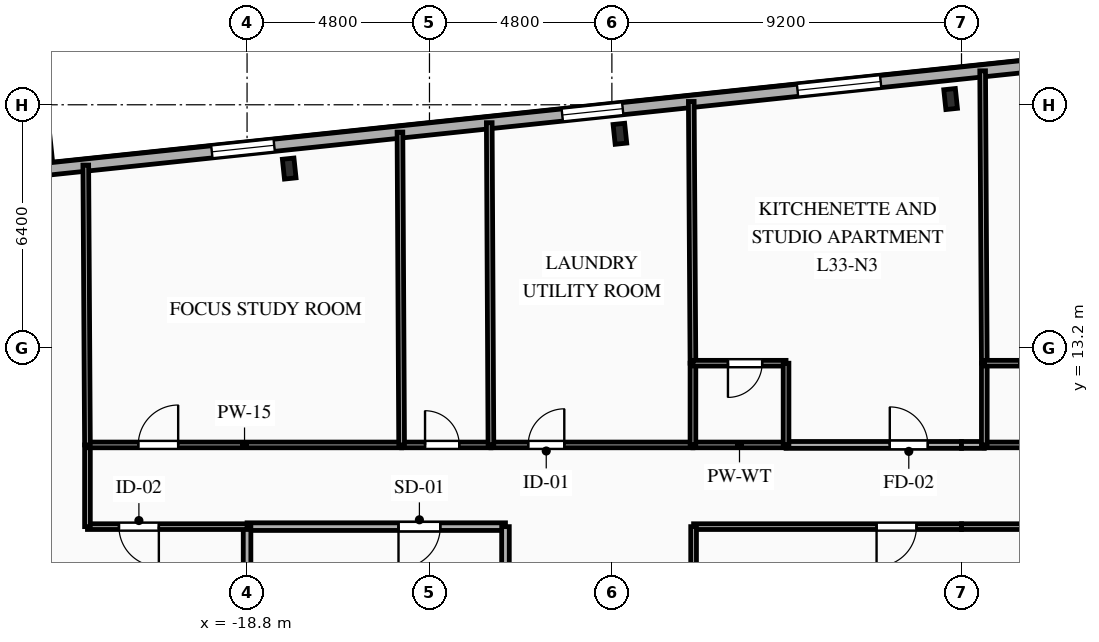
"""IFC4 building model, lengths in metres.
Left out: names, types, materials, properties, quantities, classifications, styles, units other than length and angle.
Written with IfcOpenShell. Run it as: python <this file> out.ifc"""

import sys

from ifc_helpers import new_model, si_unit, direction, frame, frame_2d, origin, origin_2d, place, context, subcontext, project, spatial, rectangle, i_section, extrude, element, fill, save


model = new_model("IFC4")
c1 = context("Model", 3, precision=1e-05, world=origin(), true_north=direction((0.0, 1.0)))
c2 = subcontext(c1, "Body", "Model", "MODEL_VIEW")
j1 = project(units=[si_unit("LENGTHUNIT", "METRE"), si_unit("PLANEANGLEUNIT", "RADIAN")], contexts=[c1])
p1 = place(None, origin())
s1 = spatial("IfcSite", under=j1, at=p1, CompositionType="ELEMENT")
p2 = place(p1, origin())
s2 = spatial("IfcBuilding", under=s1, at=p2, CompositionType="ELEMENT")
p3 = place(p2, frame((0.0, 0.0, 119.2)))
s3 = spatial("IfcBuildingStorey", under=s2, at=p3, CompositionType="ELEMENT", Elevation=119.2)
for number, where, z_axis, x_axis in (
    (1, (-0.287, 19.751, 0.0), (0.0, 0.0, 1.0), (0.995, 0.105, 0.0)),
    (2, (-8.989, 18.836, 0.0), (0.0, 0.0, 1.0), (0.995, 0.105, 0.0)),
    (3, (-17.691, 17.922, 0.0), (0.0, 0.0, 1.0), (0.995, 0.105, 0.0)),
):
    element("IfcColumn", number, at=place(p3, frame(where, z_axis=z_axis, x_axis=x_axis)), inside=s3, PredefinedType="COLUMN", context=c2, shape_type="SweptSolid", body=[
        extrude(i_section(OverallWidth=0.306, OverallDepth=0.524, WebThickness=0.021, FlangeThickness=0.04, FilletRadius=0.027, at=origin_2d()), origin(), (0.0, 0.0, 1.0), 3.35),
    ])
p4 = place(p3, frame((-27.107, 17.586, 0.0), z_axis=(0.0, 0.0, 1.0), x_axis=(0.994521628355, 0.104531003701, 0.0)))
e4 = element("IfcWall", 4, at=p4, inside=s3, PredefinedType="SOLIDWALL", context=c2, shape_type="SweptSolid", body=[
    extrude(rectangle(XDim=53.8, YDim=0.32, at=frame_2d((26.9, 0.0))), origin(), (0.0, 0.0, 1.0), 3.045),
])
p5 = place(p4, frame((1.457, 0.0, 0.85)))
e5 = element("IfcOpeningElement", 5, at=p5, cuts=e4, PredefinedType="OPENING", context=c2, shape_type="SweptSolid", body=[
    extrude(rectangle(XDim=1.65, YDim=1.85, at=frame_2d((0.825, 0.925))), frame((0.0, 0.17, 0.0), z_axis=(0.0, -1.0, 0.0), x_axis=(1.0, 0.0, 0.0)), (0.0, 0.0, 1.0), 0.34),
])
p6 = place(p4, frame((7.421, 0.0, 0.85)))
e6 = element("IfcOpeningElement", 6, at=p6, cuts=e4, PredefinedType="OPENING", context=c2, shape_type="SweptSolid", body=[
    extrude(rectangle(XDim=1.65, YDim=1.85, at=frame_2d((0.825, 0.925))), frame((0.0, 0.17, 0.0), z_axis=(0.0, -1.0, 0.0), x_axis=(1.0, 0.0, 0.0)), (0.0, 0.0, 1.0), 0.34),
])
p7 = place(p4, frame((16.693, 0.0, 0.85)))
e7 = element("IfcOpeningElement", 7, at=p7, cuts=e4, PredefinedType="OPENING", context=c2, shape_type="SweptSolid", body=[
    extrude(rectangle(XDim=1.6, YDim=1.85, at=frame_2d((0.8, 0.925))), frame((0.0, 0.17, 0.0), z_axis=(0.0, -1.0, 0.0), x_axis=(1.0, 0.0, 0.0)), (0.0, 0.0, 1.0), 0.34),
])
p8 = place(p4, frame((22.918, 0.0, 0.85)))
e8 = element("IfcOpeningElement", 8, at=p8, cuts=e4, PredefinedType="OPENING", context=c2, shape_type="SweptSolid", body=[
    extrude(rectangle(XDim=2.2, YDim=1.85, at=frame_2d((1.1, 0.925))), frame((0.0, 0.17, 0.0), z_axis=(0.0, -1.0, 0.0), x_axis=(1.0, 0.0, 0.0)), (0.0, 0.0, 1.0), 0.34),
])
p9 = place(p4, frame((30.604, 0.0, 0.85)))
e9 = element("IfcOpeningElement", 9, at=p9, cuts=e4, PredefinedType="OPENING", context=c2, shape_type="SweptSolid", body=[
    extrude(rectangle(XDim=2.2, YDim=1.85, at=frame_2d((1.1, 0.925))), frame((0.0, 0.17, 0.0), z_axis=(0.0, -1.0, 0.0), x_axis=(1.0, 0.0, 0.0)), (0.0, 0.0, 1.0), 0.34),
])
p10 = place(p4, frame((38.289, 0.0, 0.85)))
e10 = element("IfcOpeningElement", 10, at=p10, cuts=e4, PredefinedType="OPENING", context=c2, shape_type="SweptSolid", body=[
    extrude(rectangle(XDim=2.2, YDim=1.85, at=frame_2d((1.1, 0.925))), frame((0.0, 0.17, 0.0), z_axis=(0.0, -1.0, 0.0), x_axis=(1.0, 0.0, 0.0)), (0.0, 0.0, 1.0), 0.34),
])
p11 = place(p4, frame((44.208, 0.0, 0.85)))
e11 = element("IfcOpeningElement", 11, at=p11, cuts=e4, PredefinedType="OPENING", context=c2, shape_type="SweptSolid", body=[
    extrude(rectangle(XDim=1.65, YDim=1.85, at=frame_2d((0.825, 0.925))), frame((0.0, 0.17, 0.0), z_axis=(0.0, -1.0, 0.0), x_axis=(1.0, 0.0, 0.0)), (0.0, 0.0, 1.0), 0.34),
])
p12 = place(p4, frame((47.771, 0.0, 0.85)))
e12 = element("IfcOpeningElement", 12, at=p12, cuts=e4, PredefinedType="OPENING", context=c2, shape_type="SweptSolid", body=[
    extrude(rectangle(XDim=1.65, YDim=1.85, at=frame_2d((0.825, 0.925))), frame((0.0, 0.17, 0.0), z_axis=(0.0, -1.0, 0.0), x_axis=(1.0, 0.0, 0.0)), (0.0, 0.0, 1.0), 0.34),
])
p13 = place(p4, frame((51.079, 0.0, 0.85)))
e13 = element("IfcOpeningElement", 13, at=p13, cuts=e4, PredefinedType="OPENING", context=c2, shape_type="SweptSolid", body=[
    extrude(rectangle(XDim=1.6, YDim=1.85, at=frame_2d((0.8, 0.925))), frame((0.0, 0.17, 0.0), z_axis=(0.0, -1.0, 0.0), x_axis=(1.0, 0.0, 0.0)), (0.0, 0.0, 1.0), 0.34),
])
p14 = place(p3, frame((-12.0, 8.5, 0.0), z_axis=(0.0, 0.0, 1.0), x_axis=(-1.0, 0.0, 0.0)))
e14 = element("IfcWall", 14, at=p14, inside=s3, PredefinedType="PARTITIONING", context=c2, shape_type="SweptSolid", body=[
    extrude(rectangle(XDim=6.8, YDim=0.2, at=frame_2d((3.4, 0.0))), origin(), (0.0, 0.0, 1.0), 3.045),
])
p15 = place(p14, frame((1.715, 0.0, 0.0)))
e15 = element("IfcOpeningElement", 15, at=p15, cuts=e14, PredefinedType="OPENING", context=c2, shape_type="SweptSolid", body=[
    extrude(rectangle(XDim=1.1, YDim=2.15, at=frame_2d((0.55, 1.075))), frame((0.0, 0.11, 0.0), z_axis=(0.0, -1.0, 0.0), x_axis=(1.0, 0.0, 0.0)), (0.0, 0.0, 1.0), 0.22),
])
p16 = place(p3, frame((-12.0, 5.6, 0.0), z_axis=(0.0, 0.0, 1.0), x_axis=(0.0, 1.0, 0.0)))
e16 = element("IfcWall", 16, at=p16, inside=s3, PredefinedType="PARTITIONING", context=c2, shape_type="SweptSolid", body=[
    extrude(rectangle(XDim=2.9, YDim=0.2, at=frame_2d((1.45, 0.0))), origin(), (0.0, 0.0, 1.0), 3.045),
])
p17 = place(p3, frame((-18.8, 8.5, 0.0), z_axis=(0.0, 0.0, 1.0), x_axis=(0.0, -1.0, 0.0)))
e17 = element("IfcWall", 17, at=p17, inside=s3, PredefinedType="PARTITIONING", context=c2, shape_type="SweptSolid", body=[
    extrude(rectangle(XDim=2.9, YDim=0.2, at=frame_2d((1.45, 0.0))), origin(), (0.0, 0.0, 1.0), 2.53),
])
p18 = place(p3, frame((-18.8, 8.5, 0.0), z_axis=(0.0, 0.0, 1.0), x_axis=(-1.0, 0.0, 0.0)))
e18 = element("IfcWall", 18, at=p18, inside=s3, PredefinedType="PARTITIONING", context=c2, shape_type="SweptSolid", body=[
    extrude(rectangle(XDim=4.2, YDim=0.15, at=frame_2d((2.1, 0.0))), origin(), (0.0, 0.0, 1.0), 3.045),
])
p19 = place(p18, frame((2.321, 0.0, 0.0)))
e19 = element("IfcOpeningElement", 19, at=p19, cuts=e18, PredefinedType="OPENING", context=c2, shape_type="SweptSolid", body=[
    extrude(rectangle(XDim=1.05, YDim=2.15, at=frame_2d((0.525, 1.075))), frame((0.0, 0.085, 0.0), z_axis=(0.0, -1.0, 0.0), x_axis=(1.0, 0.0, 0.0)), (0.0, 0.0, 1.0), 0.17),
])
p20 = place(p3, frame((-23.0, 8.5, 0.0), z_axis=(0.0, 0.0, 1.0), x_axis=(0.0, 1.0, 0.0)))
e20 = element("IfcWall", 20, at=p20, inside=s3, PredefinedType="PARTITIONING", context=c2, shape_type="SweptSolid", body=[
    extrude(rectangle(XDim=2.15, YDim=0.15, at=frame_2d((1.075, 0.0))), origin(), (0.0, 0.0, 1.0), 3.045),
])
p21 = place(p3, frame((-23.0, 10.65, 0.0), z_axis=(0.0, 0.0, 1.0), x_axis=(1.0, 0.0, 0.0)))
e21 = element("IfcWall", 21, at=p21, inside=s3, PredefinedType="PARTITIONING", context=c2, shape_type="SweptSolid", body=[
    extrude(rectangle(XDim=8.267, YDim=0.15, at=frame_2d((4.134, 0.0))), origin(), (0.0, 0.0, 1.0), 3.045),
])
p22 = place(p21, frame((1.337, 0.0, 0.0)))
e22 = element("IfcOpeningElement", 22, at=p22, cuts=e21, PredefinedType="OPENING", context=c2, shape_type="SweptSolid", body=[
    extrude(rectangle(XDim=1.05, YDim=2.15, at=frame_2d((0.525, 1.075))), frame((0.0, 0.085, 0.0), z_axis=(0.0, -1.0, 0.0), x_axis=(1.0, 0.0, 0.0)), (0.0, 0.0, 1.0), 0.17),
])
p23 = place(p3, frame((-14.733, 10.65, 0.0), z_axis=(0.0, 0.0, 1.0), x_axis=(1.0, 0.0, 0.0)))
e23 = element("IfcWall", 23, at=p23, inside=s3, PredefinedType="PLUMBINGWALL", context=c2, shape_type="SweptSolid", body=[
    extrude(rectangle(XDim=2.35, YDim=0.15, at=frame_2d((1.175, 0.0))), origin(), (0.0, 0.0, 1.0), 3.045),
])
p24 = place(p23, frame((0.616, 0.0, 0.0)))
e24 = element("IfcOpeningElement", 24, at=p24, cuts=e23, PredefinedType="OPENING", context=c2, shape_type="SweptSolid", body=[
    extrude(rectangle(XDim=0.9, YDim=2.1, at=frame_2d((0.45, 1.05))), frame((0.0, 0.085, 0.0), z_axis=(0.0, -1.0, 0.0), x_axis=(1.0, 0.0, 0.0)), (0.0, 0.0, 1.0), 0.17),
])
p25 = place(p3, frame((-12.383, 10.65, 0.0), z_axis=(0.0, 0.0, 1.0), x_axis=(1.0, 0.0, 0.0)))
e25 = element("IfcWall", 25, at=p25, inside=s3, PredefinedType="PARTITIONING", context=c2, shape_type="SweptSolid", body=[
    extrude(rectangle(XDim=5.316, YDim=0.15, at=frame_2d((2.658, 0.0))), origin(), (0.0, 0.0, 1.0), 3.045),
])
p26 = place(p25, frame((0.981, 0.0, 0.0)))
e26 = element("IfcOpeningElement", 26, at=p26, cuts=e25, PredefinedType="OPENING", context=c2, shape_type="SweptSolid", body=[
    extrude(rectangle(XDim=0.95, YDim=2.1, at=frame_2d((0.475, 1.05))), frame((0.0, 0.085, 0.0), z_axis=(0.0, -1.0, 0.0), x_axis=(1.0, 0.0, 0.0)), (0.0, 0.0, 1.0), 0.17),
])
p27 = place(p3, frame((-4.617, 10.65, 0.0), z_axis=(0.0, 0.0, 1.0), x_axis=(1.0, 0.0, 0.0)))
e27 = element("IfcWall", 27, at=p27, inside=s3, PredefinedType="PARTITIONING", context=c2, shape_type="SweptSolid", body=[
    extrude(rectangle(XDim=4.617, YDim=0.18, at=frame_2d((2.309, 0.0))), origin(), (0.0, 0.0, 1.0), 3.045),
])
p28 = place(p27, frame((2.73, 0.0, 0.0)))
e28 = element("IfcOpeningElement", 28, at=p28, cuts=e27, PredefinedType="OPENING", context=c2, shape_type="SweptSolid", body=[
    extrude(rectangle(XDim=1.0, YDim=2.15, at=frame_2d((0.5, 1.075))), frame((0.0, 0.1, 0.0), z_axis=(0.0, -1.0, 0.0), x_axis=(1.0, 0.0, 0.0)), (0.0, 0.0, 1.0), 0.2),
])
p29 = place(p3, frame((-7.067, 10.65, 0.0), z_axis=(0.0, 0.0, 1.0), x_axis=(1.0, 0.0, 0.0)))
e29 = element("IfcWall", 29, at=p29, inside=s3, PredefinedType="PLUMBINGWALL", context=c2, shape_type="SweptSolid", body=[
    extrude(rectangle(XDim=2.45, YDim=0.15, at=frame_2d((1.225, 0.0))), origin(), (0.0, 0.0, 1.0), 3.045),
])
p30 = place(p3, frame((0.0, 8.5, 0.0), z_axis=(0.0, 0.0, 1.0), x_axis=(-1.0, 0.0, 0.0)))
e30 = element("IfcWall", 30, at=p30, inside=s3, PredefinedType="PARTITIONING", context=c2, shape_type="SweptSolid", body=[
    extrude(rectangle(XDim=7.05, YDim=0.15, at=frame_2d((3.525, 0.0))), origin(), (0.0, 0.0, 1.0), 3.045),
])
p31 = place(p30, frame((1.185, 0.0, 0.0)))
e31 = element("IfcOpeningElement", 31, at=p31, cuts=e30, PredefinedType="OPENING", context=c2, shape_type="SweptSolid", body=[
    extrude(rectangle(XDim=1.05, YDim=2.15, at=frame_2d((0.525, 1.075))), frame((0.0, 0.085, 0.0), z_axis=(0.0, -1.0, 0.0), x_axis=(1.0, 0.0, 0.0)), (0.0, 0.0, 1.0), 0.17),
])
p32 = place(p3, frame((0.0, 10.65, 0.0), z_axis=(0.0, 0.0, 1.0), x_axis=(1.0, 0.0, 0.0)))
e32 = element("IfcWall", 32, at=p32, inside=s3, PredefinedType="PARTITIONING", context=c2, shape_type="SweptSolid", body=[
    extrude(rectangle(XDim=0.6, YDim=0.18, at=frame_2d((0.3, 0.0))), origin(), (0.0, 0.0, 1.0), 3.045),
])
p33 = place(p3, frame((0.6, 10.65, 0.0), z_axis=(0.0, 0.0, 1.0), x_axis=(1.0, 0.0, 0.0)))
e33 = element("IfcWall", 33, at=p33, inside=s3, PredefinedType="PLUMBINGWALL", context=c2, shape_type="SweptSolid", body=[
    extrude(rectangle(XDim=2.45, YDim=0.15, at=frame_2d((1.225, 0.0))), origin(), (0.0, 0.0, 1.0), 3.045),
])
for number, where, z_axis, x_axis in (
    (34, (7.05, 8.5, 0.0), (0.0, 0.0, 1.0), (-1.0, 0.0, 0.0)),
    (35, (-7.05, 8.5, 0.0), (0.0, 0.0, 1.0), (0.0, -1.0, 0.0)),
):
    element("IfcWall", number, at=place(p3, frame(where, z_axis=z_axis, x_axis=x_axis)), inside=s3, PredefinedType="PARTITIONING", context=c2, shape_type="SweptSolid", body=[
        extrude(rectangle(XDim=7.05, YDim=0.15, at=frame_2d((3.525, 0.0))), origin(), (0.0, 0.0, 1.0), 3.045),
    ])
p34 = place(p3, frame((-23.044, 18.013, 0.0), z_axis=(0.0, 0.0, 1.0), x_axis=(0.005968459246, -0.999982188588, 0.0)))
e36 = element("IfcWall", 36, at=p34, inside=s3, PredefinedType="PARTITIONING", context=c2, shape_type="SweptSolid", body=[
    extrude(rectangle(XDim=7.363, YDim=0.15, at=frame_2d((3.682, 0.0))), origin(), (0.0, 0.0, 1.0), 3.045),
])
p35 = place(p3, frame((-14.777, 18.882, 0.0), z_axis=(0.0, 0.0, 1.0), x_axis=(0.005338477179, -0.999985750229, 0.0)))
e37 = element("IfcWall", 37, at=p35, inside=s3, PredefinedType="PLUMBINGWALL", context=c2, shape_type="SweptSolid", body=[
    extrude(rectangle(XDim=8.232, YDim=0.15, at=frame_2d((4.116, 0.0))), origin(), (0.0, 0.0, 1.0), 3.045),
])
p36 = place(p3, frame((-12.427, 19.129, 0.0), z_axis=(0.0, 0.0, 1.0), x_axis=(0.005182918666, -0.999986568587, 0.0)))
e38 = element("IfcWall", 38, at=p36, inside=s3, PredefinedType="PLUMBINGWALL", context=c2, shape_type="SweptSolid", body=[
    extrude(rectangle(XDim=8.479, YDim=0.15, at=frame_2d((4.239, 0.0))), origin(), (0.0, 0.0, 1.0), 3.045),
])
p37 = place(p3, frame((-7.111, 19.688, 0.0), z_axis=(0.0, 0.0, 1.0), x_axis=(0.006380360007, -0.999979645296, 0.0)))
e39 = element("IfcWall", 39, at=p37, inside=s3, PredefinedType="PARTITIONING", context=c2, shape_type="SweptSolid", body=[
    extrude(rectangle(XDim=6.888, YDim=0.15, at=frame_2d((3.444, 0.0))), origin(), (0.0, 0.0, 1.0), 3.045),
])
p38 = place(p3, frame((-7.067, 12.8, 0.0), z_axis=(0.0, 0.0, 1.0), x_axis=(0.0, -1.0, 0.0)))
e40 = element("IfcWall", 40, at=p38, inside=s3, PredefinedType="PLUMBINGWALL", context=c2, shape_type="SweptSolid", body=[
    extrude(rectangle(XDim=2.15, YDim=0.15, at=frame_2d((1.075, 0.0))), origin(), (0.0, 0.0, 1.0), 3.045),
])
p39 = place(p3, frame((-4.617, 12.8, 0.0), z_axis=(0.0, 0.0, 1.0), x_axis=(-1.0, 0.0, 0.0)))
e41 = element("IfcWall", 41, at=p39, inside=s3, PredefinedType="PLUMBINGWALL", context=c2, shape_type="SweptSolid", body=[
    extrude(rectangle(XDim=2.45, YDim=0.15, at=frame_2d((1.225, 0.0))), origin(), (0.0, 0.0, 1.0), 3.045),
])
p40 = place(p39, frame((0.629, 0.0, 0.0)))
e42 = element("IfcOpeningElement", 42, at=p40, cuts=e41, PredefinedType="OPENING", context=c2, shape_type="SweptSolid", body=[
    extrude(rectangle(XDim=0.9, YDim=2.1, at=frame_2d((0.45, 1.05))), frame((0.0, 0.085, 0.0), z_axis=(0.0, -1.0, 0.0), x_axis=(1.0, 0.0, 0.0)), (0.0, 0.0, 1.0), 0.17),
])
p41 = place(p3, frame((-4.617, 10.65, 0.0), z_axis=(0.0, 0.0, 1.0), x_axis=(0.0, 1.0, 0.0)))
e43 = element("IfcWall", 43, at=p41, inside=s3, PredefinedType="PLUMBINGWALL", context=c2, shape_type="SweptSolid", body=[
    extrude(rectangle(XDim=2.15, YDim=0.15, at=frame_2d((1.075, 0.0))), origin(), (0.0, 0.0, 1.0), 3.045),
])
p42 = place(p3, frame((0.556, 20.493, 0.0), z_axis=(0.0, 0.0, 1.0), x_axis=(0.005712016487, -0.999983686301, 0.0)))
e44 = element("IfcWall", 44, at=p42, inside=s3, PredefinedType="PARTITIONING", context=c2, shape_type="SweptSolid", body=[
    extrude(rectangle(XDim=7.694, YDim=0.15, at=frame_2d((3.847, 0.0))), origin(), (0.0, 0.0, 1.0), 3.045),
])
p43 = place(p3, frame((0.6, 12.8, 0.0), z_axis=(0.0, 0.0, 1.0), x_axis=(0.0, -1.0, 0.0)))
e45 = element("IfcWall", 45, at=p43, inside=s3, PredefinedType="PLUMBINGWALL", context=c2, shape_type="SweptSolid", body=[
    extrude(rectangle(XDim=2.15, YDim=0.15, at=frame_2d((1.075, 0.0))), origin(), (0.0, 0.0, 1.0), 3.045),
])
p44 = place(p3, frame((3.05, 12.8, 0.0), z_axis=(0.0, 0.0, 1.0), x_axis=(-1.0, 0.0, 0.0)))
e46 = element("IfcWall", 46, at=p44, inside=s3, PredefinedType="PLUMBINGWALL", context=c2, shape_type="SweptSolid", body=[
    extrude(rectangle(XDim=2.45, YDim=0.15, at=frame_2d((1.225, 0.0))), origin(), (0.0, 0.0, 1.0), 3.045),
])
p45 = place(p44, frame((0.629, 0.0, 0.0)))
e47 = element("IfcOpeningElement", 47, at=p45, cuts=e46, PredefinedType="OPENING", context=c2, shape_type="SweptSolid", body=[
    extrude(rectangle(XDim=0.9, YDim=2.1, at=frame_2d((0.45, 1.05))), frame((0.0, 0.085, 0.0), z_axis=(0.0, -1.0, 0.0), x_axis=(1.0, 0.0, 0.0)), (0.0, 0.0, 1.0), 0.17),
])
p46 = place(p6, origin())
e48 = element("IfcWindow", 48, at=p46, inside=s3, PartitioningType="SINGLE_PANEL", PredefinedType="WINDOW", context=c2, shape_type="SweptSolid", body=[
    extrude(rectangle(XDim=1.65, YDim=1.85, at=frame_2d((0.825, 0.925))), frame((0.0, 0.03, 0.0), z_axis=(0.0, -1.0, 0.0), x_axis=(1.0, 0.0, 0.0)), (0.0, 0.0, 1.0), 0.06),
])
fill(e6, e48)
p47 = place(p7, origin())
e49 = element("IfcWindow", 49, at=p47, inside=s3, PartitioningType="SINGLE_PANEL", PredefinedType="WINDOW", context=c2, shape_type="SweptSolid", body=[
    extrude(rectangle(XDim=1.6, YDim=1.85, at=frame_2d((0.8, 0.925))), frame((0.0, 0.03, 0.0), z_axis=(0.0, -1.0, 0.0), x_axis=(1.0, 0.0, 0.0)), (0.0, 0.0, 1.0), 0.06),
])
fill(e7, e49)
p48 = place(p8, origin())
e50 = element("IfcWindow", 50, at=p48, inside=s3, PartitioningType="SINGLE_PANEL", PredefinedType="WINDOW", context=c2, shape_type="SweptSolid", body=[
    extrude(rectangle(XDim=2.2, YDim=1.85, at=frame_2d((1.1, 0.925))), frame((0.0, 0.03, 0.0), z_axis=(0.0, -1.0, 0.0), x_axis=(1.0, 0.0, 0.0)), (0.0, 0.0, 1.0), 0.06),
])
fill(e8, e50)
p49 = place(p15, origin())
e51 = element("IfcDoor", 51, at=p49, inside=s3, OperationType="SINGLE_SWING_RIGHT", PredefinedType="DOOR", context=c2, shape_type="SweptSolid", body=[
    extrude(rectangle(XDim=1.1, YDim=2.15, at=frame_2d((0.55, 1.075))), frame((0.0, 0.025, 0.0), z_axis=(0.0, -1.0, 0.0), x_axis=(1.0, 0.0, 0.0)), (0.0, 0.0, 1.0), 0.05),
])
fill(e15, e51)
p50 = place(p19, origin())
e52 = element("IfcDoor", 52, at=p50, inside=s3, OperationType="SINGLE_SWING_LEFT", PredefinedType="DOOR", context=c2, shape_type="SweptSolid", body=[
    extrude(rectangle(XDim=1.05, YDim=2.15, at=frame_2d((0.525, 1.075))), frame((0.0, 0.025, 0.0), z_axis=(0.0, -1.0, 0.0), x_axis=(1.0, 0.0, 0.0)), (0.0, 0.0, 1.0), 0.05),
])
fill(e19, e52)
p51 = place(p22, origin())
e53 = element("IfcDoor", 53, at=p51, inside=s3, OperationType="SINGLE_SWING_RIGHT", PredefinedType="DOOR", context=c2, shape_type="SweptSolid", body=[
    extrude(rectangle(XDim=1.05, YDim=2.15, at=frame_2d((0.525, 1.075))), frame((0.0, 0.025, 0.0), z_axis=(0.0, -1.0, 0.0), x_axis=(1.0, 0.0, 0.0)), (0.0, 0.0, 1.0), 0.05),
])
fill(e22, e53)
p52 = place(p24, origin())
e54 = element("IfcDoor", 54, at=p52, inside=s3, OperationType="SINGLE_SWING_LEFT", PredefinedType="DOOR", context=c2, shape_type="SweptSolid", body=[
    extrude(rectangle(XDim=0.9, YDim=2.1, at=frame_2d((0.45, 1.05))), frame((0.0, 0.025, 0.0), z_axis=(0.0, -1.0, 0.0), x_axis=(1.0, 0.0, 0.0)), (0.0, 0.0, 1.0), 0.05),
])
fill(e24, e54)
p53 = place(p26, origin())
e55 = element("IfcDoor", 55, at=p53, inside=s3, OperationType="SINGLE_SWING_RIGHT", PredefinedType="DOOR", context=c2, shape_type="SweptSolid", body=[
    extrude(rectangle(XDim=0.95, YDim=2.1, at=frame_2d((0.475, 1.05))), frame((0.0, 0.025, 0.0), z_axis=(0.0, -1.0, 0.0), x_axis=(1.0, 0.0, 0.0)), (0.0, 0.0, 1.0), 0.05),
])
fill(e26, e55)
p54 = place(p28, origin())
e56 = element("IfcDoor", 56, at=p54, inside=s3, OperationType="SINGLE_SWING_LEFT", PredefinedType="DOOR", context=c2, shape_type="SweptSolid", body=[
    extrude(rectangle(XDim=1.0, YDim=2.15, at=frame_2d((0.5, 1.075))), frame((0.0, 0.025, 0.0), z_axis=(0.0, -1.0, 0.0), x_axis=(1.0, 0.0, 0.0)), (0.0, 0.0, 1.0), 0.05),
])
fill(e28, e56)
p55 = place(p31, origin())
e57 = element("IfcDoor", 57, at=p55, inside=s3, OperationType="SINGLE_SWING_RIGHT", PredefinedType="DOOR", context=c2, shape_type="SweptSolid", body=[
    extrude(rectangle(XDim=1.05, YDim=2.15, at=frame_2d((0.525, 1.075))), frame((0.0, 0.025, 0.0), z_axis=(0.0, -1.0, 0.0), x_axis=(1.0, 0.0, 0.0)), (0.0, 0.0, 1.0), 0.05),
])
fill(e31, e57)
p56 = place(p40, origin())
e58 = element("IfcDoor", 58, at=p56, inside=s3, OperationType="SINGLE_SWING_RIGHT", PredefinedType="DOOR", context=c2, shape_type="SweptSolid", body=[
    extrude(rectangle(XDim=0.9, YDim=2.1, at=frame_2d((0.45, 1.05))), frame((0.0, 0.025, 0.0), z_axis=(0.0, -1.0, 0.0), x_axis=(1.0, 0.0, 0.0)), (0.0, 0.0, 1.0), 0.05),
])
fill(e42, e58)
p57 = place(p45, origin())
e59 = element("IfcDoor", 59, at=p57, inside=s3, OperationType="SINGLE_SWING_LEFT", PredefinedType="DOOR", context=c2, shape_type="SweptSolid", body=[
    extrude(rectangle(XDim=0.9, YDim=2.1, at=frame_2d((0.45, 1.05))), frame((0.0, 0.025, 0.0), z_axis=(0.0, -1.0, 0.0), x_axis=(1.0, 0.0, 0.0)), (0.0, 0.0, 1.0), 0.05),
])
fill(e47, e59)
save(model, sys.argv[1])
